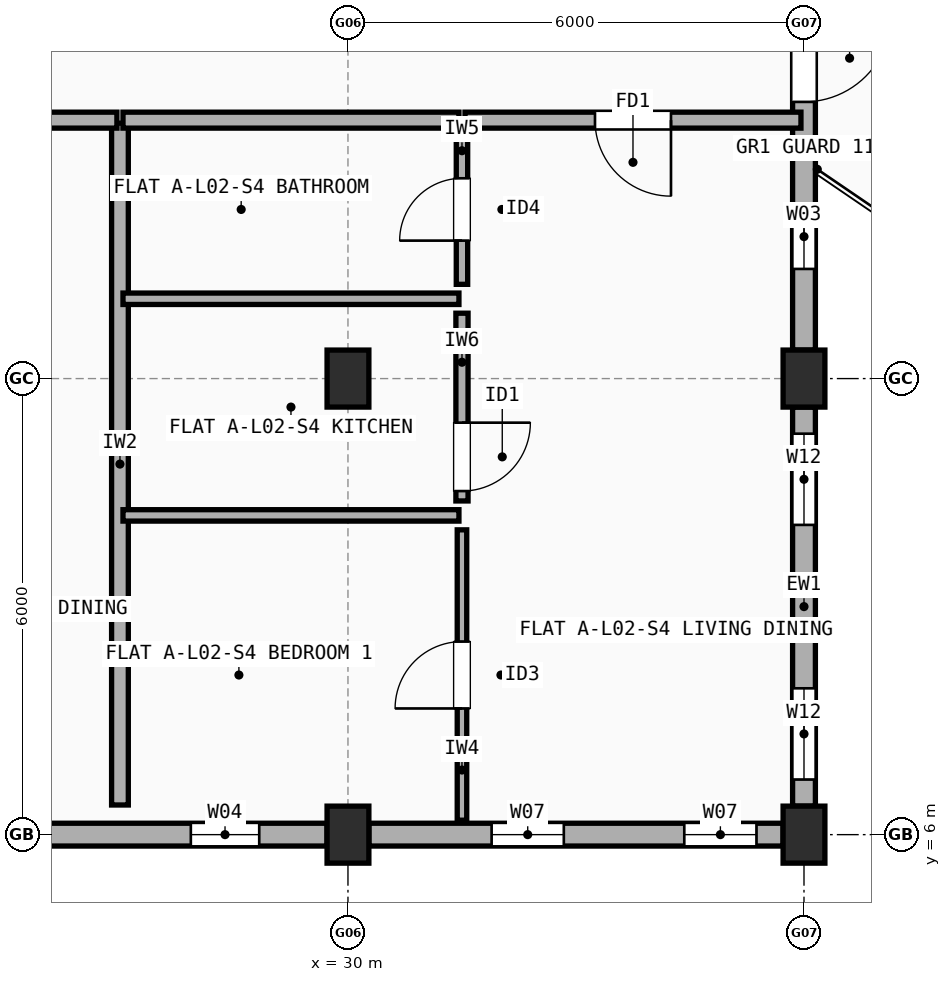
"""IFC4 building model, lengths in metres.
Left out: names, types, materials, properties, quantities, classifications, styles, units other than length and angle.
Written with IfcOpenShell. Run it as: python <this file> out.ifc"""

import sys

from ifc_helpers import new_model, si_unit, direction, frame, frame_2d, origin, origin_2d, place, context, subcontext, project, spatial, rectangle, extrude, element, fill, save


model = new_model("IFC4")
c1 = context("Model", 3, precision=1e-05, world=origin(), true_north=direction((0.0, 1.0)))
c2 = subcontext(c1, "Body", "Model", "MODEL_VIEW")
j1 = project(units=[si_unit("LENGTHUNIT", "METRE"), si_unit("PLANEANGLEUNIT", "RADIAN")], contexts=[c1])
p1 = place(None, origin())
s1 = spatial("IfcSite", under=j1, at=p1, CompositionType="ELEMENT")
p2 = place(p1, origin())
s2 = spatial("IfcBuilding", under=s1, at=p2, CompositionType="ELEMENT")
p3 = place(p2, frame((0.0, 0.0, 7.7)))
s3 = spatial("IfcBuildingStorey", under=s2, at=p3, CompositionType="ELEMENT", Elevation=7.7)
for number, where, z_axis, x_axis in (
    (1, (30.0, 6.0, 0.0), (0.0, 0.0, 1.0), (1.0, 0.0, 0.0)),
    (2, (30.0, 12.0, 0.0), (0.0, 0.0, 1.0), (1.0, 0.0, 0.0)),
    (3, (36.0, 6.0, 0.0), (0.0, 0.0, 1.0), (1.0, 0.0, 0.0)),
    (4, (36.0, 12.0, 0.0), (0.0, 0.0, 1.0), (1.0, 0.0, 0.0)),
):
    element("IfcColumn", number, at=place(p3, frame(where, z_axis=z_axis, x_axis=x_axis)), inside=s3, PredefinedType="COLUMN", context=c2, shape_type="SweptSolid", body=[
        extrude(rectangle(XDim=0.55, YDim=0.75, at=origin_2d()), origin(), (0.0, 0.0, 1.0), 2.955),
    ])
p4 = place(p3, frame((24.325, 6.0, 0.0), z_axis=(0.0, 0.0, 1.0), x_axis=(1.0, 0.0, 0.0)))
e5 = element("IfcWall", 5, at=p4, inside=s3, PredefinedType="STANDARD", context=c2, shape_type="SweptSolid", body=[
    extrude(rectangle(XDim=5.4, YDim=0.3, at=frame_2d((2.7, 0.0))), origin(), (0.0, 0.0, 1.0), 2.437),
])
p5 = place(p4, frame((0.893, 0.0, 0.9)))
e6 = element("IfcOpeningElement", 6, at=p5, cuts=e5, PredefinedType="OPENING", context=c2, shape_type="SweptSolid", body=[
    extrude(rectangle(XDim=0.85, YDim=1.25, at=frame_2d((0.425, 0.625))), frame((0.0, 0.16, 0.0), z_axis=(0.0, -1.0, 0.0), x_axis=(1.0, 0.0, 0.0)), (0.0, 0.0, 1.0), 0.32),
])
p6 = place(p4, frame((3.607, 0.0, 0.9)))
e7 = element("IfcOpeningElement", 7, at=p6, cuts=e5, PredefinedType="OPENING", context=c2, shape_type="SweptSolid", body=[
    extrude(rectangle(XDim=0.9, YDim=1.3, at=frame_2d((0.45, 0.65))), frame((0.0, 0.16, 0.0), z_axis=(0.0, -1.0, 0.0), x_axis=(1.0, 0.0, 0.0)), (0.0, 0.0, 1.0), 0.32),
])
p7 = place(p3, frame((30.275, 6.0, 0.0), z_axis=(0.0, 0.0, 1.0), x_axis=(1.0, 0.0, 0.0)))
e8 = element("IfcWall", 8, at=p7, inside=s3, PredefinedType="STANDARD", context=c2, shape_type="SweptSolid", body=[
    extrude(rectangle(XDim=5.45, YDim=0.3, at=frame_2d((2.725, 0.0))), origin(), (0.0, 0.0, 1.0), 2.437),
])
p8 = place(p7, frame((1.615, 0.0, 0.9)))
e9 = element("IfcOpeningElement", 9, at=p8, cuts=e8, PredefinedType="OPENING", context=c2, shape_type="SweptSolid", body=[
    extrude(rectangle(XDim=0.95, YDim=1.35, at=frame_2d((0.475, 0.675))), frame((0.0, 0.16, 0.0), z_axis=(0.0, -1.0, 0.0), x_axis=(1.0, 0.0, 0.0)), (0.0, 0.0, 1.0), 0.32),
])
p9 = place(p7, frame((4.15, 0.0, 0.9)))
e10 = element("IfcOpeningElement", 10, at=p9, cuts=e8, PredefinedType="OPENING", context=c2, shape_type="SweptSolid", body=[
    extrude(rectangle(XDim=0.95, YDim=1.35, at=frame_2d((0.475, 0.675))), frame((0.0, 0.16, 0.0), z_axis=(0.0, -1.0, 0.0), x_axis=(1.0, 0.0, 0.0)), (0.0, 0.0, 1.0), 0.32),
])
p10 = place(p3, frame((36.0, 6.375, 0.0), z_axis=(0.0, 0.0, 1.0), x_axis=(0.0, 1.0, 0.0)))
e11 = element("IfcWall", 11, at=p10, inside=s3, PredefinedType="STANDARD", context=c2, shape_type="SweptSolid", body=[
    extrude(rectangle(XDim=5.25, YDim=0.3, at=frame_2d((2.625, 0.0))), origin(), (0.0, 0.0, 1.0), 2.437),
])
p11 = place(p10, frame((0.35, 0.0, 0.9)))
e12 = element("IfcOpeningElement", 12, at=p11, cuts=e11, PredefinedType="OPENING", context=c2, shape_type="SweptSolid", body=[
    extrude(rectangle(XDim=1.2, YDim=1.35, at=frame_2d((0.6, 0.675))), frame((0.0, 0.16, 0.0), z_axis=(0.0, -1.0, 0.0), x_axis=(1.0, 0.0, 0.0)), (0.0, 0.0, 1.0), 0.32),
])
p12 = place(p10, frame((3.7, 0.0, 0.9)))
e13 = element("IfcOpeningElement", 13, at=p12, cuts=e11, PredefinedType="OPENING", context=c2, shape_type="SweptSolid", body=[
    extrude(rectangle(XDim=1.2, YDim=1.35, at=frame_2d((0.6, 0.675))), frame((0.0, 0.16, 0.0), z_axis=(0.0, -1.0, 0.0), x_axis=(1.0, 0.0, 0.0)), (0.0, 0.0, 1.0), 0.32),
])
p13 = place(p3, frame((36.0, 12.375, 0.0), z_axis=(0.0, 0.0, 1.0), x_axis=(0.0, 1.0, 0.0)))
e14 = element("IfcWall", 14, at=p13, inside=s3, PredefinedType="STANDARD", context=c2, shape_type="SweptSolid", body=[
    extrude(rectangle(XDim=5.25, YDim=0.3, at=frame_2d((2.625, 0.0))), origin(), (0.0, 0.0, 1.0), 2.437),
])
p14 = place(p13, frame((3.265, 0.0, 0.0)))
e15 = element("IfcOpeningElement", 15, at=p14, cuts=e14, PredefinedType="OPENING", context=c2, shape_type="SweptSolid", body=[
    extrude(rectangle(XDim=1.15, YDim=2.15, at=frame_2d((0.575, 1.075))), frame((0.0, 0.16, 0.0), z_axis=(0.0, -1.0, 0.0), x_axis=(1.0, 0.0, 0.0)), (0.0, 0.0, 1.0), 0.32),
])
p15 = place(p13, frame((1.067, 0.0, 0.9)))
e16 = element("IfcOpeningElement", 16, at=p15, cuts=e14, PredefinedType="OPENING", context=c2, shape_type="SweptSolid", body=[
    extrude(rectangle(XDim=0.85, YDim=1.25, at=frame_2d((0.425, 0.625))), frame((0.0, 0.16, 0.0), z_axis=(0.0, -1.0, 0.0), x_axis=(1.0, 0.0, 0.0)), (0.0, 0.0, 1.0), 0.32),
])
p16 = place(p3, frame((27.0, 6.39, 0.0), z_axis=(0.0, 0.0, 1.0), x_axis=(0.0, 1.0, 0.0)))
e17 = element("IfcWall", 17, at=p16, inside=s3, PredefinedType="SOLIDWALL", context=c2, shape_type="SweptSolid", body=[
    extrude(rectangle(XDim=8.97, YDim=0.22, at=frame_2d((4.485, 0.0))), origin(), (0.0, 0.0, 1.0), 2.387),
])
p17 = place(p3, frame((22.54, 15.4, 0.0), z_axis=(0.0, 0.0, 1.0), x_axis=(1.0, 0.0, 0.0)))
e18 = element("IfcWall", 18, at=p17, inside=s3, PredefinedType="SOLIDWALL", context=c2, shape_type="SweptSolid", body=[
    extrude(rectangle(XDim=4.42, YDim=0.21, at=frame_2d((2.21, 0.0))), origin(), (0.0, 0.0, 1.0), 2.337),
])
p18 = place(p17, frame((1.685, 0.0, 0.0)))
e19 = element("IfcOpeningElement", 19, at=p18, cuts=e18, PredefinedType="OPENING", context=c2, shape_type="SweptSolid", body=[
    extrude(rectangle(XDim=1.05, YDim=2.15, at=frame_2d((0.525, 1.075))), frame((0.0, 0.115, 0.0), z_axis=(0.0, -1.0, 0.0), x_axis=(1.0, 0.0, 0.0)), (0.0, 0.0, 1.0), 0.23),
])
p19 = place(p3, frame((27.04, 15.4, 0.0), z_axis=(0.0, 0.0, 1.0), x_axis=(1.0, 0.0, 0.0)))
e20 = element("IfcWall", 20, at=p19, inside=s3, PredefinedType="SOLIDWALL", context=c2, shape_type="SweptSolid", body=[
    extrude(rectangle(XDim=4.42, YDim=0.21, at=frame_2d((2.21, 0.0))), origin(), (0.0, 0.0, 1.0), 2.437),
])
p20 = place(p3, frame((31.54, 15.4, 0.0), z_axis=(0.0, 0.0, 1.0), x_axis=(1.0, 0.0, 0.0)))
e21 = element("IfcWall", 21, at=p20, inside=s3, PredefinedType="SOLIDWALL", context=c2, shape_type="SweptSolid", body=[
    extrude(rectangle(XDim=4.42, YDim=0.21, at=frame_2d((2.21, 0.0))), origin(), (0.0, 0.0, 1.0), 2.437),
])
p21 = place(p20, frame((1.71, 0.0, 0.0)))
e22 = element("IfcOpeningElement", 22, at=p21, cuts=e21, PredefinedType="OPENING", context=c2, shape_type="SweptSolid", body=[
    extrude(rectangle(XDim=1.0, YDim=2.15, at=frame_2d((0.5, 1.075))), frame((0.0, 0.115, 0.0), z_axis=(0.0, -1.0, 0.0), x_axis=(1.0, 0.0, 0.0)), (0.0, 0.0, 1.0), 0.23),
])
p22 = place(p3, frame((31.5, 6.19, 0.0), z_axis=(0.0, 0.0, 1.0), x_axis=(0.0, 1.0, 0.0)))
e23 = element("IfcWall", 23, at=p22, inside=s3, PredefinedType="PARTITIONING", context=c2, shape_type="SweptSolid", body=[
    extrude(rectangle(XDim=3.82, YDim=0.125, at=frame_2d((1.91, 0.0))), origin(), (0.0, 0.0, 1.0), 2.955),
])
p23 = place(p22, frame((1.47, 0.0, 0.0)))
e24 = element("IfcOpeningElement", 24, at=p23, cuts=e23, PredefinedType="OPENING", context=c2, shape_type="SweptSolid", body=[
    extrude(rectangle(XDim=0.88, YDim=2.1, at=frame_2d((0.44, 1.05))), frame((0.0, 0.073, 0.0), z_axis=(0.0, -1.0, 0.0), x_axis=(1.0, 0.0, 0.0)), (0.0, 0.0, 1.0), 0.145),
])
p24 = place(p3, frame((31.5, 10.39, 0.0), z_axis=(0.0, 0.0, 1.0), x_axis=(0.0, 1.0, 0.0)))
e25 = element("IfcWall", 25, at=p24, inside=s3, PredefinedType="PLUMBINGWALL", context=c2, shape_type="SweptSolid", body=[
    extrude(rectangle(XDim=2.47, YDim=0.16, at=frame_2d((1.235, 0.0))), origin(), (0.0, 0.0, 1.0), 2.387),
])
p25 = place(p24, frame((0.13, 0.0, 0.0)))
e26 = element("IfcOpeningElement", 26, at=p25, cuts=e25, PredefinedType="OPENING", context=c2, shape_type="SweptSolid", body=[
    extrude(rectangle(XDim=0.9, YDim=2.1, at=frame_2d((0.45, 1.05))), frame((0.0, 0.09, 0.0), z_axis=(0.0, -1.0, 0.0), x_axis=(1.0, 0.0, 0.0)), (0.0, 0.0, 1.0), 0.18),
])
p26 = place(p3, frame((31.5, 13.24, 0.0), z_axis=(0.0, 0.0, 1.0), x_axis=(0.0, 1.0, 0.0)))
e27 = element("IfcWall", 27, at=p26, inside=s3, PredefinedType="PARTITIONING", context=c2, shape_type="SweptSolid", body=[
    extrude(rectangle(XDim=1.97, YDim=0.15, at=frame_2d((0.985, 0.0))), origin(), (0.0, 0.0, 1.0), 2.955),
])
p27 = place(p26, frame((0.575, 0.0, 0.0)))
e28 = element("IfcOpeningElement", 28, at=p27, cuts=e27, PredefinedType="OPENING", context=c2, shape_type="SweptSolid", body=[
    extrude(rectangle(XDim=0.82, YDim=2.08, at=frame_2d((0.41, 1.04))), frame((0.0, 0.085, 0.0), z_axis=(0.0, -1.0, 0.0), x_axis=(1.0, 0.0, 0.0)), (0.0, 0.0, 1.0), 0.17),
])
for number, where, z_axis, x_axis in (
    (29, (27.04, 10.2, 0.0), (0.0, 0.0, 1.0), (1.0, 0.0, 0.0)),
    (30, (27.04, 13.05, 0.0), (0.0, 0.0, 1.0), (1.0, 0.0, 0.0)),
):
    element("IfcWall", number, at=place(p3, frame(where, z_axis=z_axis, x_axis=x_axis)), inside=s3, PredefinedType="PARTITIONING", context=c2, shape_type="SweptSolid", body=[
        extrude(rectangle(XDim=4.42, YDim=0.15, at=frame_2d((2.21, 0.0))), origin(), (0.0, 0.0, 1.0), 2.437),
    ])
p28 = place(p6, origin())
e31 = element("IfcWindow", 31, at=p28, inside=s3, PartitioningType="SINGLE_PANEL", PredefinedType="WINDOW", context=c2, shape_type="SweptSolid", body=[
    extrude(rectangle(XDim=0.9, YDim=1.3, at=frame_2d((0.45, 0.65))), frame((0.0, 0.03, 0.0), z_axis=(0.0, -1.0, 0.0), x_axis=(1.0, 0.0, 0.0)), (0.0, 0.0, 1.0), 0.06),
])
fill(e7, e31)
p29 = place(p8, origin())
e32 = element("IfcWindow", 32, at=p29, inside=s3, PartitioningType="SINGLE_PANEL", PredefinedType="WINDOW", context=c2, shape_type="SweptSolid", body=[
    extrude(rectangle(XDim=0.95, YDim=1.35, at=frame_2d((0.475, 0.675))), frame((0.0, 0.03, 0.0), z_axis=(0.0, -1.0, 0.0), x_axis=(1.0, 0.0, 0.0)), (0.0, 0.0, 1.0), 0.06),
])
fill(e9, e32)
p30 = place(p9, origin())
e33 = element("IfcWindow", 33, at=p30, inside=s3, PartitioningType="SINGLE_PANEL", PredefinedType="WINDOW", context=c2, shape_type="SweptSolid", body=[
    extrude(rectangle(XDim=0.95, YDim=1.35, at=frame_2d((0.475, 0.675))), frame((0.0, 0.03, 0.0), z_axis=(0.0, -1.0, 0.0), x_axis=(1.0, 0.0, 0.0)), (0.0, 0.0, 1.0), 0.06),
])
fill(e10, e33)
p31 = place(p11, origin())
e34 = element("IfcWindow", 34, at=p31, inside=s3, PartitioningType="SINGLE_PANEL", PredefinedType="WINDOW", context=c2, shape_type="SweptSolid", body=[
    extrude(rectangle(XDim=1.2, YDim=1.35, at=frame_2d((0.6, 0.675))), frame((0.0, 0.03, 0.0), z_axis=(0.0, -1.0, 0.0), x_axis=(1.0, 0.0, 0.0)), (0.0, 0.0, 1.0), 0.06),
])
fill(e12, e34)
p32 = place(p12, origin())
e35 = element("IfcWindow", 35, at=p32, inside=s3, PartitioningType="SINGLE_PANEL", PredefinedType="WINDOW", context=c2, shape_type="SweptSolid", body=[
    extrude(rectangle(XDim=1.2, YDim=1.35, at=frame_2d((0.6, 0.675))), frame((0.0, 0.03, 0.0), z_axis=(0.0, -1.0, 0.0), x_axis=(1.0, 0.0, 0.0)), (0.0, 0.0, 1.0), 0.06),
])
fill(e13, e35)
p33 = place(p14, frame((1.15, 0.0, 0.0), z_axis=(0.0, 0.0, 1.0), x_axis=(-1.0, 0.0, 0.0)))
e36 = element("IfcDoor", 36, at=p33, inside=s3, OperationType="SINGLE_SWING_RIGHT", PredefinedType="DOOR", context=c2, shape_type="SweptSolid", body=[
    extrude(rectangle(XDim=1.15, YDim=2.15, at=frame_2d((0.575, 1.075))), frame((0.0, 0.025, 0.0), z_axis=(0.0, -1.0, 0.0), x_axis=(1.0, 0.0, 0.0)), (0.0, 0.0, 1.0), 0.05),
])
fill(e15, e36)
p34 = place(p15, origin())
e37 = element("IfcWindow", 37, at=p34, inside=s3, PartitioningType="SINGLE_PANEL", PredefinedType="WINDOW", context=c2, shape_type="SweptSolid", body=[
    extrude(rectangle(XDim=0.85, YDim=1.25, at=frame_2d((0.425, 0.625))), frame((0.0, 0.03, 0.0), z_axis=(0.0, -1.0, 0.0), x_axis=(1.0, 0.0, 0.0)), (0.0, 0.0, 1.0), 0.06),
])
fill(e16, e37)
p35 = place(p21, origin())
e38 = element("IfcDoor", 38, at=p35, inside=s3, OperationType="SINGLE_SWING_RIGHT", PredefinedType="DOOR", context=c2, shape_type="SweptSolid", body=[
    extrude(rectangle(XDim=1.0, YDim=2.15, at=frame_2d((0.5, 1.075))), frame((0.0, 0.025, 0.0), z_axis=(0.0, -1.0, 0.0), x_axis=(1.0, 0.0, 0.0)), (0.0, 0.0, 1.0), 0.05),
])
fill(e22, e38)
p36 = place(p23, origin())
e39 = element("IfcDoor", 39, at=p36, inside=s3, OperationType="SINGLE_SWING_LEFT", PredefinedType="DOOR", context=c2, shape_type="SweptSolid", body=[
    extrude(rectangle(XDim=0.88, YDim=2.1, at=frame_2d((0.44, 1.05))), frame((0.0, 0.025, 0.0), z_axis=(0.0, -1.0, 0.0), x_axis=(1.0, 0.0, 0.0)), (0.0, 0.0, 1.0), 0.05),
])
fill(e24, e39)
p37 = place(p25, origin())
e40 = element("IfcDoor", 40, at=p37, inside=s3, OperationType="SINGLE_SWING_RIGHT", PredefinedType="DOOR", context=c2, shape_type="SweptSolid", body=[
    extrude(rectangle(XDim=0.9, YDim=2.1, at=frame_2d((0.45, 1.05))), frame((0.0, 0.025, 0.0), z_axis=(0.0, -1.0, 0.0), x_axis=(1.0, 0.0, 0.0)), (0.0, 0.0, 1.0), 0.05),
])
fill(e26, e40)
p38 = place(p27, origin())
e41 = element("IfcDoor", 41, at=p38, inside=s3, OperationType="SINGLE_SWING_LEFT", PredefinedType="DOOR", context=c2, shape_type="SweptSolid", body=[
    extrude(rectangle(XDim=0.82, YDim=2.08, at=frame_2d((0.41, 1.04))), frame((0.0, 0.025, 0.0), z_axis=(0.0, -1.0, 0.0), x_axis=(1.0, 0.0, 0.0)), (0.0, 0.0, 1.0), 0.05),
])
fill(e28, e41)
save(model, sys.argv[1])
